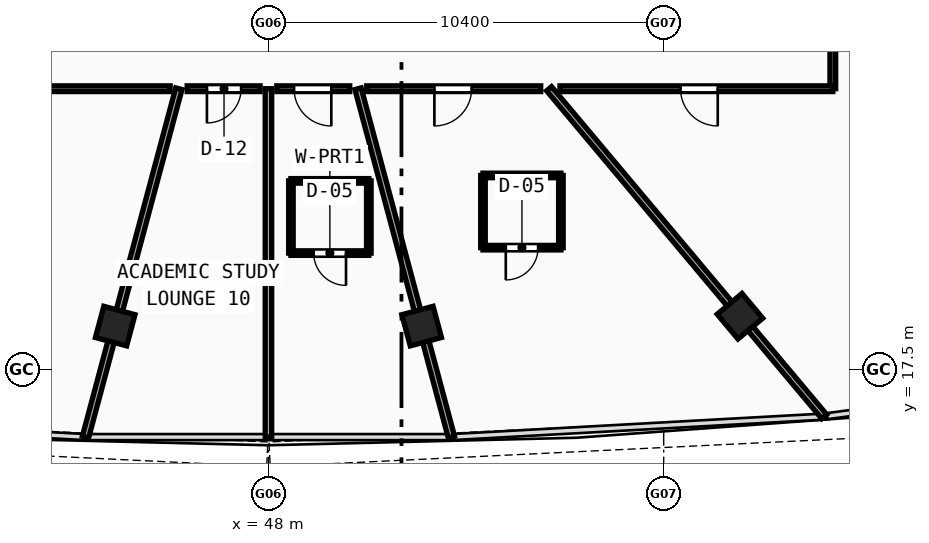
"""IFC4 building model, lengths in metres.
Left out: names, types, materials, properties, quantities, classifications, styles, units other than length and angle.
Written with IfcOpenShell. Run it as: python <this file> out.ifc"""

import sys

from ifc_helpers import new_model, si_unit, direction, frame, frame_2d, origin, origin_with_axes, origin_2d, place, context, subcontext, project, spatial, rectangle, hollow_rectangle, extrude, source, transform, mapped, element, fill, save


model = new_model("IFC4")
c1 = context("Model", 3, precision=1e-05, world=origin(), true_north=direction((0.0, 1.0)))
c2 = subcontext(c1, "Body", "Model", "MODEL_VIEW")
j1 = project(units=[si_unit("LENGTHUNIT", "METRE"), si_unit("PLANEANGLEUNIT", "RADIAN")], contexts=[c1])
p1 = place(None, origin())
s1 = spatial("IfcSite", under=j1, at=p1, CompositionType="ELEMENT")
p2 = place(p1, origin())
s2 = spatial("IfcBuilding", under=s1, at=p2, CompositionType="ELEMENT")
p3 = place(p2, frame((0.0, 0.0, 233.34)))
s3 = spatial("IfcBuildingStorey", under=s2, at=p3, CompositionType="ELEMENT", Elevation=233.34)
m1 = source(origin(), c2, "Body", "SweptSolid", [
    extrude(hollow_rectangle(XDim=0.85, YDim=0.85, WallThickness=0.034, at=origin_2d()), origin(), (0.0, 0.0, 1.0), 3.73),
])
for number, where, z_axis, x_axis in (
    (1, (43.969, 18.654, -0.26), (0.0, 0.0, 1.0), (0.966, -0.259, 0.0)),
    (2, (52.031, 18.654, -0.26), (0.0, 0.0, 1.0), (0.966, 0.259, 0.0)),
    (3, (60.407, 18.914, -0.26), (0.0, 0.0, 1.0), (0.766, 0.643, 0.0)),
):
    element("IfcColumn", number, at=place(p3, frame(where, z_axis=z_axis, x_axis=x_axis)), inside=s3, PredefinedType="COLUMN", context=c2, shape_type="MappedRepresentation", body=[
        mapped(m1, transform((0.0, 0.0, 0.0), scale=1.0)),
    ])
p4 = place(p3, frame((45.642, 24.9, 0.0), z_axis=(0.0, 0.0, 1.0), x_axis=(-0.258832957733, -0.965922098304, 0.0)))
e4 = element("IfcWall", 4, at=p4, inside=s3, PredefinedType="PARTITIONING", context=c2, shape_type="SweptSolid", body=[
    extrude(rectangle(XDim=9.49, YDim=0.17, at=frame_2d((4.745, 0.0))), origin(), (0.0, 0.0, 1.0), 2.82),
])
p5 = place(p3, frame((48.0, 24.9, 0.0), z_axis=(0.0, 0.0, 1.0), x_axis=(0.0, -1.0, 0.0)))
e5 = element("IfcWall", 5, at=p5, inside=s3, PredefinedType="PARTITIONING", context=c2, shape_type="SweptSolid", body=[
    extrude(rectangle(XDim=9.167, YDim=0.17, at=frame_2d((4.583, 0.0))), origin(), (0.0, 0.0, 1.0), 2.82),
])
p6 = place(p3, frame((50.358, 24.9, 0.0), z_axis=(0.0, 0.0, 1.0), x_axis=(0.258832957733, -0.965922098304, 0.0)))
e6 = element("IfcWall", 6, at=p6, inside=s3, PredefinedType="PARTITIONING", context=c2, shape_type="SweptSolid", body=[
    extrude(rectangle(XDim=9.49, YDim=0.17, at=frame_2d((4.745, 0.0))), origin(), (0.0, 0.0, 1.0), 2.82),
])
p7 = place(p3, frame((55.384, 24.9, 0.0), z_axis=(0.0, 0.0, 1.0), x_axis=(0.642803558478, -0.766031060211, 0.0)))
e7 = element("IfcWall", 7, at=p7, inside=s3, PredefinedType="PARTITIONING", context=c2, shape_type="SweptSolid", body=[
    extrude(rectangle(XDim=11.261, YDim=0.17, at=frame_2d((5.631, 0.0))), origin(), (0.0, 0.0, 1.0), 2.82),
])
p8 = place(p3, frame((62.85, 30.858, 0.0), z_axis=(0.0, 0.0, 1.0), x_axis=(0.0, -1.0, 0.0)))
e8 = element("IfcWall", 8, at=p8, inside=s3, PredefinedType="PARTITIONING", context=c2, shape_type="SweptSolid", body=[
    extrude(rectangle(XDim=5.958, YDim=0.15, at=frame_2d((2.979, 0.0))), origin(), (0.0, 0.0, 1.0), 3.12),
])
p9 = place(p3, frame((62.85, 24.9, 0.0), z_axis=(0.0, 0.0, 1.0), x_axis=(-1.0, 0.0, 0.0)))
e9 = element("IfcWall", 9, at=p9, inside=s3, PredefinedType="PARTITIONING", context=c2, shape_type="SweptSolid", body=[
    extrude(rectangle(XDim=7.179, YDim=0.15, at=frame_2d((3.589, 0.0))), origin(), (0.0, 0.0, 1.0), 3.12),
])
p10 = place(p9, frame((3.028, 0.0, 0.0)))
e10 = element("IfcOpeningElement", 10, at=p10, cuts=e9, PredefinedType="OPENING", context=c2, shape_type="SweptSolid", body=[
    extrude(rectangle(XDim=0.98, YDim=2.12, at=frame_2d((0.49, 1.06))), frame((0.0, 0.085, 0.0), z_axis=(0.0, -1.0, 0.0), x_axis=(1.0, 0.0, 0.0)), (0.0, 0.0, 1.0), 0.17),
])
p11 = place(p3, frame((55.164, 24.9, 0.0), z_axis=(0.0, 0.0, 1.0), x_axis=(-1.0, 0.0, 0.0)))
e11 = element("IfcWall", 11, at=p11, inside=s3, PredefinedType="PARTITIONING", context=c2, shape_type="SweptSolid", body=[
    extrude(rectangle(XDim=4.579, YDim=0.15, at=frame_2d((2.289, 0.0))), origin(), (0.0, 0.0, 1.0), 2.82),
])
p12 = place(p11, frame((1.818, 0.0, 0.0)))
e12 = element("IfcOpeningElement", 12, at=p12, cuts=e11, PredefinedType="OPENING", context=c2, shape_type="SweptSolid", body=[
    extrude(rectangle(XDim=0.98, YDim=2.12, at=frame_2d((0.49, 1.06))), frame((0.0, 0.085, 0.0), z_axis=(0.0, -1.0, 0.0), x_axis=(1.0, 0.0, 0.0)), (0.0, 0.0, 1.0), 0.17),
])
p13 = place(p3, frame((50.138, 24.9, 0.0), z_axis=(0.0, 0.0, 1.0), x_axis=(-1.0, 0.0, 0.0)))
e13 = element("IfcWall", 13, at=p13, inside=s3, PredefinedType="PARTITIONING", context=c2, shape_type="SweptSolid", body=[
    extrude(rectangle(XDim=1.918, YDim=0.15, at=frame_2d((0.959, 0.0))), origin(), (0.0, 0.0, 1.0), 3.47),
])
p14 = place(p13, frame((0.484, 0.0, 0.0)))
e14 = element("IfcOpeningElement", 14, at=p14, cuts=e13, PredefinedType="OPENING", context=c2, shape_type="SweptSolid", body=[
    extrude(rectangle(XDim=0.98, YDim=2.12, at=frame_2d((0.49, 1.06))), frame((0.0, 0.085, 0.0), z_axis=(0.0, -1.0, 0.0), x_axis=(1.0, 0.0, 0.0)), (0.0, 0.0, 1.0), 0.17),
])
p15 = place(p3, frame((47.78, 24.9, 0.0), z_axis=(0.0, 0.0, 1.0), x_axis=(-1.0, 0.0, 0.0)))
e15 = element("IfcWall", 15, at=p15, inside=s3, PredefinedType="PARTITIONING", context=c2, shape_type="SweptSolid", body=[
    extrude(rectangle(XDim=1.918, YDim=0.15, at=frame_2d((0.959, 0.0))), origin(), (0.0, 0.0, 1.0), 3.47),
])
p16 = place(p15, frame((0.499, 0.0, 0.0)))
e16 = element("IfcOpeningElement", 16, at=p16, cuts=e15, PredefinedType="OPENING", context=c2, shape_type="SweptSolid", body=[
    extrude(rectangle(XDim=0.9, YDim=2.08, at=frame_2d((0.45, 1.04))), frame((0.0, 0.085, 0.0), z_axis=(0.0, -1.0, 0.0), x_axis=(1.0, 0.0, 0.0)), (0.0, 0.0, 1.0), 0.17),
])
p17 = place(p3, frame((45.414, 24.9, 0.0), z_axis=(0.0, 0.0, 1.0), x_axis=(-1.0, 0.0, 0.0)))
e17 = element("IfcWall", 17, at=p17, inside=s3, PredefinedType="PARTITIONING", context=c2, shape_type="SweptSolid", body=[
    extrude(rectangle(XDim=12.264, YDim=0.15, at=frame_2d((6.132, 0.0))), origin(), (0.0, 0.0, 1.0), 2.82),
])
p18 = place(p17, frame((5.773, 0.0, 0.0)))
e18 = element("IfcOpeningElement", 18, at=p18, cuts=e17, PredefinedType="OPENING", context=c2, shape_type="SweptSolid", body=[
    extrude(rectangle(XDim=0.98, YDim=2.12, at=frame_2d((0.49, 1.06))), frame((0.0, 0.085, 0.0), z_axis=(0.0, -1.0, 0.0), x_axis=(1.0, 0.0, 0.0)), (0.0, 0.0, 1.0), 0.17),
])
p19 = place(p3, frame((48.591, 20.575, 0.0), z_axis=(0.0, 0.0, 1.0), x_axis=(1.0, 0.0, 0.0)))
e19 = element("IfcWall", 19, at=p19, inside=s3, PredefinedType="PARTITIONING", context=c2, shape_type="SweptSolid", body=[
    extrude(rectangle(XDim=2.05, YDim=0.12, at=frame_2d((1.025, 0.0))), origin(), (0.0, 0.0, 1.0), 3.47),
])
p20 = place(p19, frame((0.6, 0.0, 0.0)))
e20 = element("IfcOpeningElement", 20, at=p20, cuts=e19, PredefinedType="OPENING", context=c2, shape_type="SweptSolid", body=[
    extrude(rectangle(XDim=0.85, YDim=2.1, at=frame_2d((0.425, 1.05))), frame((0.0, 0.07, 0.0), z_axis=(0.0, -1.0, 0.0), x_axis=(1.0, 0.0, 0.0)), (0.0, 0.0, 1.0), 0.14),
])
p21 = place(p3, frame((50.641, 20.575, 0.0), z_axis=(0.0, 0.0, 1.0), x_axis=(0.0, 1.0, 0.0)))
e21 = element("IfcWall", 21, at=p21, inside=s3, PredefinedType="PARTITIONING", context=c2, shape_type="SweptSolid", body=[
    extrude(rectangle(XDim=1.9, YDim=0.12, at=frame_2d((0.95, 0.0))), origin(), (0.0, 0.0, 1.0), 3.12),
])
p22 = place(p3, frame((50.641, 22.475, 0.0), z_axis=(0.0, 0.0, 1.0), x_axis=(-1.0, 0.0, 0.0)))
e22 = element("IfcWall", 22, at=p22, inside=s3, PredefinedType="PARTITIONING", context=c2, shape_type="SweptSolid", body=[
    extrude(rectangle(XDim=2.05, YDim=0.12, at=frame_2d((1.025, 0.0))), origin(), (0.0, 0.0, 1.0), 3.47),
])
p23 = place(p3, frame((48.591, 22.475, 0.0), z_axis=(0.0, 0.0, 1.0), x_axis=(0.0, -1.0, 0.0)))
e23 = element("IfcWall", 23, at=p23, inside=s3, PredefinedType="PARTITIONING", context=c2, shape_type="SweptSolid", body=[
    extrude(rectangle(XDim=1.9, YDim=0.12, at=frame_2d((0.95, 0.0))), origin(), (0.0, 0.0, 1.0), 3.12),
])
p24 = place(p3, frame((53.645, 20.718, 0.0), z_axis=(0.0, 0.0, 1.0), x_axis=(1.0, 0.0, 0.0)))
e24 = element("IfcWall", 24, at=p24, inside=s3, PredefinedType="PARTITIONING", context=c2, shape_type="SweptSolid", body=[
    extrude(rectangle(XDim=2.05, YDim=0.12, at=frame_2d((1.025, 0.0))), origin(), (0.0, 0.0, 1.0), 3.47),
])
p25 = place(p24, frame((0.6, 0.0, 0.0)))
e25 = element("IfcOpeningElement", 25, at=p25, cuts=e24, PredefinedType="OPENING", context=c2, shape_type="SweptSolid", body=[
    extrude(rectangle(XDim=0.85, YDim=2.1, at=frame_2d((0.425, 1.05))), frame((0.0, 0.07, 0.0), z_axis=(0.0, -1.0, 0.0), x_axis=(1.0, 0.0, 0.0)), (0.0, 0.0, 1.0), 0.14),
])
p26 = place(p3, frame((55.695, 20.718, 0.0), z_axis=(0.0, 0.0, 1.0), x_axis=(0.0, 1.0, 0.0)))
e26 = element("IfcWall", 26, at=p26, inside=s3, PredefinedType="PARTITIONING", context=c2, shape_type="SweptSolid", body=[
    extrude(rectangle(XDim=1.9, YDim=0.12, at=frame_2d((0.95, 0.0))), origin(), (0.0, 0.0, 1.0), 3.12),
])
p27 = place(p3, frame((55.695, 22.618, 0.0), z_axis=(0.0, 0.0, 1.0), x_axis=(-1.0, 0.0, 0.0)))
e27 = element("IfcWall", 27, at=p27, inside=s3, PredefinedType="PARTITIONING", context=c2, shape_type="SweptSolid", body=[
    extrude(rectangle(XDim=2.05, YDim=0.12, at=frame_2d((1.025, 0.0))), origin(), (0.0, 0.0, 1.0), 3.47),
])
p28 = place(p3, frame((53.645, 22.618, 0.0), z_axis=(0.0, 0.0, 1.0), x_axis=(0.0, -1.0, 0.0)))
e28 = element("IfcWall", 28, at=p28, inside=s3, PredefinedType="PARTITIONING", context=c2, shape_type="SweptSolid", body=[
    extrude(rectangle(XDim=1.9, YDim=0.12, at=frame_2d((0.95, 0.0))), origin(), (0.0, 0.0, 1.0), 3.12),
])
m2 = source(origin(), c2, "Body", "SweptSolid", [
    extrude(rectangle(XDim=0.9, YDim=2.08, at=frame_2d((0.45, 1.04))), frame((0.0, 0.025, 0.0), z_axis=(0.0, -1.0, 0.0), x_axis=(1.0, 0.0, 0.0)), (0.0, 0.0, 1.0), 0.05),
])
p29 = place(p16, origin_with_axes())
e29 = element("IfcDoor", 29, at=p29, inside=s3, OperationType="SINGLE_SWING_RIGHT", PredefinedType="DOOR", context=c2, shape_type="MappedRepresentation", body=[
    mapped(m2, transform((0.0, 0.0, 0.0), scale=1.0)),
])
fill(e16, e29)
m3 = source(origin(), c2, "Body", "SweptSolid", [
    extrude(rectangle(XDim=0.98, YDim=2.12, at=frame_2d((0.49, 1.06))), frame((0.0, 0.025, 0.0), z_axis=(0.0, -1.0, 0.0), x_axis=(1.0, 0.0, 0.0)), (0.0, 0.0, 1.0), 0.05),
])
p30 = place(p14, origin_with_axes())
e30 = element("IfcDoor", 30, at=p30, inside=s3, OperationType="SINGLE_SWING_LEFT", PredefinedType="DOOR", context=c2, shape_type="MappedRepresentation", body=[
    mapped(m3, transform((0.0, 0.0, 0.0), scale=1.0)),
])
fill(e14, e30)
m4 = source(origin(), c2, "Body", "SweptSolid", [
    extrude(rectangle(XDim=0.85, YDim=2.1, at=frame_2d((0.425, 1.05))), frame((0.0, 0.025, 0.0), z_axis=(0.0, -1.0, 0.0), x_axis=(1.0, 0.0, 0.0)), (0.0, 0.0, 1.0), 0.05),
])
p31 = place(p20, frame((0.85, 0.0, 0.0), z_axis=(0.0, 0.0, 1.0), x_axis=(-1.0, 0.0, 0.0)))
e31 = element("IfcDoor", 31, at=p31, inside=s3, OperationType="SINGLE_SWING_LEFT", PredefinedType="DOOR", context=c2, shape_type="MappedRepresentation", body=[
    mapped(m4, transform((0.0, 0.0, 0.0), scale=1.0)),
])
fill(e20, e31)
p32 = place(p12, origin_with_axes())
e32 = element("IfcDoor", 32, at=p32, inside=s3, OperationType="SINGLE_SWING_RIGHT", PredefinedType="DOOR", context=c2, shape_type="MappedRepresentation", body=[
    mapped(m3, transform((0.0, 0.0, 0.0), scale=1.0)),
])
fill(e12, e32)
p33 = place(p25, frame((0.85, 0.0, 0.0), z_axis=(0.0, 0.0, 1.0), x_axis=(-1.0, 0.0, 0.0)))
e33 = element("IfcDoor", 33, at=p33, inside=s3, OperationType="SINGLE_SWING_RIGHT", PredefinedType="DOOR", context=c2, shape_type="MappedRepresentation", body=[
    mapped(m4, transform((0.0, 0.0, 0.0), scale=1.0)),
])
fill(e25, e33)
p34 = place(p10, origin_with_axes())
e34 = element("IfcDoor", 34, at=p34, inside=s3, OperationType="SINGLE_SWING_LEFT", PredefinedType="DOOR", context=c2, shape_type="MappedRepresentation", body=[
    mapped(m3, transform((0.0, 0.0, 0.0), scale=1.0)),
])
fill(e10, e34)
save(model, sys.argv[1])
